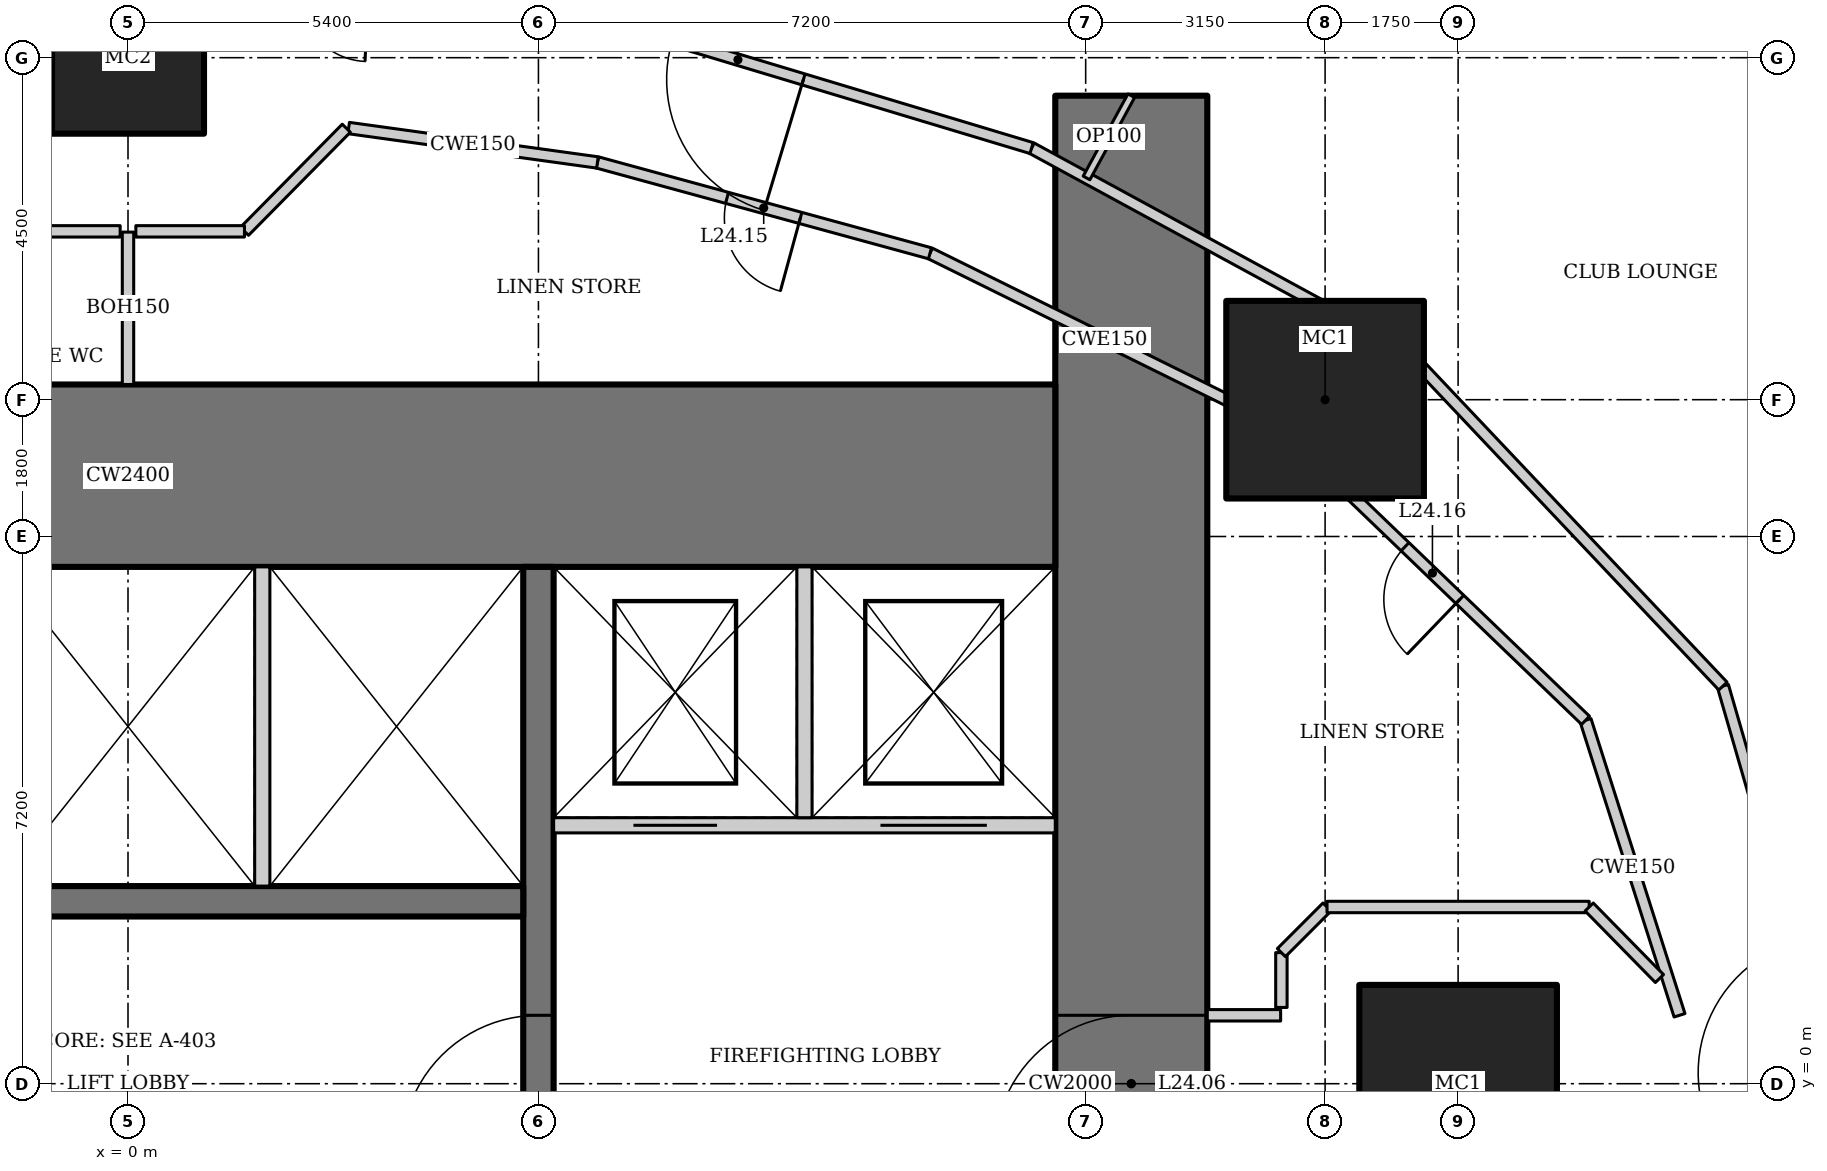
"""IFC4 building model, lengths in metres.
Left out: names, types, materials, properties, quantities, classifications, styles, units other than length and angle.
Written with IfcOpenShell. Run it as: python <this file> out.ifc"""

import sys

from ifc_helpers import new_model, si_unit, direction, frame, frame_2d, origin, origin_2d, place, context, subcontext, project, spatial, rectangle, hollow_rectangle, extrude, element, fill, save


model = new_model("IFC4")
c1 = context("Model", 3, precision=1e-05, world=origin(), true_north=direction((0.0, 1.0)))
c2 = subcontext(c1, "Body", "Model", "MODEL_VIEW")
j1 = project(units=[si_unit("LENGTHUNIT", "METRE"), si_unit("PLANEANGLEUNIT", "RADIAN")], contexts=[c1])
p1 = place(None, origin())
s1 = spatial("IfcSite", under=j1, at=p1, CompositionType="ELEMENT")
p2 = place(p1, origin())
s2 = spatial("IfcBuilding", under=s1, at=p2, CompositionType="ELEMENT")
p3 = place(p2, frame((0.0, 0.0, 101.8)))
s3 = spatial("IfcBuildingStorey", under=s2, at=p3, CompositionType="ELEMENT", Elevation=101.8)
for number, where, z_axis, x_axis in (
    (1, (17.5, 0.0, 0.0), (0.0, 0.0, 1.0), (1.0, 0.0, 0.0)),
    (2, (15.75, 9.0, 0.0), (0.0, 0.0, 1.0), (1.0, 0.0, 0.0)),
):
    element("IfcColumn", number, at=place(p3, frame(where, z_axis=z_axis, x_axis=x_axis)), inside=s3, PredefinedType="COLUMN", context=c2, shape_type="SweptSolid", body=[
        extrude(hollow_rectangle(XDim=2.6, YDim=2.6, WallThickness=0.13, at=origin_2d()), origin(), (0.0, 0.0, 1.0), 3.6),
    ])
p4 = place(p3, frame((0.0, 13.5, 0.0), z_axis=(0.0, 0.0, 1.0), x_axis=(1.0, 0.0, 0.0)))
e3 = element("IfcColumn", 3, at=p4, inside=s3, PredefinedType="COLUMN", context=c2, shape_type="SweptSolid", body=[
    extrude(hollow_rectangle(XDim=2.0, YDim=2.0, WallThickness=0.17, at=origin_2d()), origin(), (0.0, 0.0, 1.0), 3.6),
])
p5 = place(p3, frame((13.2, -13.0, 0.0), z_axis=(0.0, 0.0, 1.0), x_axis=(0.0, 1.0, 0.0)))
e4 = element("IfcWall", 4, at=p5, inside=s3, PredefinedType="SHEAR", context=c2, shape_type="SweptSolid", body=[
    extrude(rectangle(XDim=26.0, YDim=2.0, at=frame_2d((13.0, 0.0))), origin(), (0.0, 0.0, 1.0), 3.6),
])
p6 = place(p5, frame((12.1, 0.0, 0.0)))
e5 = element("IfcOpeningElement", 5, at=p6, cuts=e4, PredefinedType="OPENING", context=c2, shape_type="SweptSolid", body=[
    extrude(rectangle(XDim=1.8, YDim=2.1, at=frame_2d((0.9, 1.05))), frame((0.0, 1.01, 0.0), z_axis=(0.0, -1.0, 0.0), x_axis=(1.0, 0.0, 0.0)), (0.0, 0.0, 1.0), 2.02),
])
p7 = place(p3, frame((12.2, 8.0, 0.0), z_axis=(0.0, 0.0, 1.0), x_axis=(-1.0, 0.0, 0.0)))
e6 = element("IfcWall", 6, at=p7, inside=s3, PredefinedType="SHEAR", context=c2, shape_type="SweptSolid", body=[
    extrude(rectangle(XDim=24.4, YDim=2.4, at=frame_2d((12.2, 0.0))), origin(), (0.0, 0.0, 1.0), 3.6),
])
p8 = place(p3, frame((5.4, -6.8, 0.0), z_axis=(0.0, 0.0, 1.0), x_axis=(0.0, 1.0, 0.0)))
e7 = element("IfcWall", 7, at=p8, inside=s3, PredefinedType="SHEAR", context=c2, shape_type="SweptSolid", body=[
    extrude(rectangle(XDim=13.6, YDim=0.4, at=frame_2d((6.8, 0.0))), origin(), (0.0, 0.0, 1.0), 3.6),
])
p9 = place(p8, frame((5.9, 0.0, 0.0)))
e8 = element("IfcOpeningElement", 8, at=p9, cuts=e7, PredefinedType="OPENING", context=c2, shape_type="SweptSolid", body=[
    extrude(rectangle(XDim=1.8, YDim=2.1, at=frame_2d((0.9, 1.05))), frame((0.0, 0.21, 0.0), z_axis=(0.0, -1.0, 0.0), x_axis=(1.0, 0.0, 0.0)), (0.0, 0.0, 1.0), 0.42),
])
p10 = place(p3, frame((5.2, 2.4, 0.0), z_axis=(0.0, 0.0, 1.0), x_axis=(-1.0, 0.0, 0.0)))
e9 = element("IfcWall", 9, at=p10, inside=s3, PredefinedType="SHEAR", context=c2, shape_type="SweptSolid", body=[
    extrude(rectangle(XDim=10.4, YDim=0.4, at=frame_2d((5.2, 0.0))), origin(), (0.0, 0.0, 1.0), 3.6),
])
p11 = place(p3, frame((1.767, 2.6, 0.0), z_axis=(0.0, 0.0, 1.0), x_axis=(0.0, 1.0, 0.0)))
e10 = element("IfcWall", 10, at=p11, inside=s3, PredefinedType="SOLIDWALL", context=c2, shape_type="SweptSolid", body=[
    extrude(rectangle(XDim=4.2, YDim=0.2, at=frame_2d((2.1, 0.0))), origin(), (0.0, 0.0, 1.0), 3.6),
])
p12 = place(p3, frame((12.2, 3.4, 0.0), z_axis=(0.0, 0.0, 1.0), x_axis=(-1.0, 0.0, 0.0)))
e11 = element("IfcWall", 11, at=p12, inside=s3, PredefinedType="SOLIDWALL", context=c2, shape_type="SweptSolid", body=[
    extrude(rectangle(XDim=6.6, YDim=0.2, at=frame_2d((3.3, 0.0))), origin(), (0.0, 0.0, 1.0), 3.6),
])
p13 = place(p12, frame((4.45, 0.0, 0.0)))
e12 = element("IfcOpeningElement", 12, at=p13, cuts=e11, PredefinedType="OPENING", context=c2, shape_type="SweptSolid", body=[
    extrude(rectangle(XDim=1.1, YDim=2.2, at=frame_2d((0.55, 1.1))), frame((0.0, 0.11, 0.0), z_axis=(0.0, -1.0, 0.0), x_axis=(1.0, 0.0, 0.0)), (0.0, 0.0, 1.0), 0.22),
])
p14 = place(p12, frame((0.9, 0.0, 0.0)))
e13 = element("IfcOpeningElement", 13, at=p14, cuts=e11, PredefinedType="OPENING", context=c2, shape_type="SweptSolid", body=[
    extrude(rectangle(XDim=1.4, YDim=2.2, at=frame_2d((0.7, 1.1))), frame((0.0, 0.11, 0.0), z_axis=(0.0, -1.0, 0.0), x_axis=(1.0, 0.0, 0.0)), (0.0, 0.0, 1.0), 0.22),
])
p15 = place(p3, frame((8.9, 3.5, 0.0), z_axis=(0.0, 0.0, 1.0), x_axis=(0.0, 1.0, 0.0)))
e14 = element("IfcWall", 14, at=p15, inside=s3, PredefinedType="SOLIDWALL", context=c2, shape_type="SweptSolid", body=[
    extrude(rectangle(XDim=3.3, YDim=0.2, at=frame_2d((1.65, 0.0))), origin(), (0.0, 0.0, 1.0), 3.6),
])
p16 = place(p3, frame((22.5, 0.0, 0.0), z_axis=(0.0, 0.0, 1.0), x_axis=(-0.278247435376, 0.960509429785, 0.0)))
e15 = element("IfcWall", 15, at=p16, inside=s3, PredefinedType="PARTITIONING", context=c2, shape_type="SweptSolid", body=[
    extrude(rectangle(XDim=5.447, YDim=0.15, at=frame_2d((2.724, 0.0))), origin(), (0.0, 0.0, 1.0), 3.4),
])
p17 = place(p16, frame((0.15, 0.0, 0.0)))
e16 = element("IfcOpeningElement", 16, at=p17, cuts=e15, PredefinedType="OPENING", context=c2, shape_type="SweptSolid", body=[
    extrude(rectangle(XDim=1.8, YDim=2.1, at=frame_2d((0.9, 1.05))), frame((0.0, 0.085, 0.0), z_axis=(0.0, -1.0, 0.0), x_axis=(1.0, 0.0, 0.0)), (0.0, 0.0, 1.0), 0.17),
])
p18 = place(p3, frame((20.984, 5.232, 0.0), z_axis=(0.0, 0.0, 1.0), x_axis=(-0.687062608696, 0.726598218916, 0.0)))
e17 = element("IfcWall", 17, at=p18, inside=s3, PredefinedType="PARTITIONING", context=c2, shape_type="SweptSolid", body=[
    extrude(rectangle(XDim=6.039, YDim=0.15, at=frame_2d((3.02, 0.0))), origin(), (0.0, 0.0, 1.0), 3.4),
])
p19 = place(p3, frame((16.835, 9.62, 0.0), z_axis=(0.0, 0.0, 1.0), x_axis=(-0.878450059298, 0.477834169267, 0.0)))
e18 = element("IfcWall", 18, at=p19, inside=s3, PredefinedType="PARTITIONING", context=c2, shape_type="SweptSolid", body=[
    extrude(rectangle(XDim=5.631, YDim=0.15, at=frame_2d((2.815, 0.0))), origin(), (0.0, 0.0, 1.0), 3.4),
])
p20 = place(p3, frame((11.888, 12.311, 0.0), z_axis=(0.0, 0.0, 1.0), x_axis=(-0.957564241242, 0.288219922793, 0.0)))
e19 = element("IfcWall", 19, at=p20, inside=s3, PredefinedType="PARTITIONING", context=c2, shape_type="SweptSolid", body=[
    extrude(rectangle(XDim=5.085, YDim=0.15, at=frame_2d((2.542, 0.0))), origin(), (0.0, 0.0, 1.0), 3.4),
])
p21 = place(p20, frame((3.135, 0.0, 0.0)))
e20 = element("IfcOpeningElement", 20, at=p21, cuts=e19, PredefinedType="OPENING", context=c2, shape_type="SweptSolid", body=[
    extrude(rectangle(XDim=1.8, YDim=2.1, at=frame_2d((0.9, 1.05))), frame((0.0, 0.085, 0.0), z_axis=(0.0, -1.0, 0.0), x_axis=(1.0, 0.0, 0.0)), (0.0, 0.0, 1.0), 0.17),
])
p22 = place(p3, frame((20.984, -5.232, 0.0), z_axis=(0.0, 0.0, 1.0), x_axis=(0.278247435376, 0.960509429785, 0.0)))
e21 = element("IfcWall", 21, at=p22, inside=s3, PredefinedType="PARTITIONING", context=c2, shape_type="SweptSolid", body=[
    extrude(rectangle(XDim=5.447, YDim=0.15, at=frame_2d((2.724, 0.0))), origin(), (0.0, 0.0, 1.0), 3.4),
])
p23 = place(p22, frame((4.397, 0.0, 0.0)))
e22 = element("IfcOpeningElement", 22, at=p23, cuts=e21, PredefinedType="OPENING", context=c2, shape_type="SweptSolid", body=[
    extrude(rectangle(XDim=0.9, YDim=2.1, at=frame_2d((0.45, 1.05))), frame((0.0, 0.085, 0.0), z_axis=(0.0, -1.0, 0.0), x_axis=(1.0, 0.0, 0.0)), (0.0, 0.0, 1.0), 0.17),
])
p24 = place(p3, frame((20.413, 0.9, 0.0), z_axis=(0.0, 0.0, 1.0), x_axis=(-0.303505448228, 0.952829702988, 0.0)))
e23 = element("IfcWall", 23, at=p24, inside=s3, PredefinedType="PARTITIONING", context=c2, shape_type="SweptSolid", body=[
    extrude(rectangle(XDim=4.073, YDim=0.15, at=frame_2d((2.037, 0.0))), origin(), (0.0, 0.0, 1.0), 3.4),
])
p25 = place(p3, frame((19.177, 4.781, 0.0), z_axis=(0.0, 0.0, 1.0), x_axis=(-0.720837261072, 0.693104352209, 0.0)))
e24 = element("IfcWall", 24, at=p25, inside=s3, PredefinedType="PARTITIONING", context=c2, shape_type="SweptSolid", body=[
    extrude(rectangle(XDim=5.59, YDim=0.15, at=frame_2d((2.795, 0.0))), origin(), (0.0, 0.0, 1.0), 3.4),
])
p26 = place(p25, frame((2.295, 0.0, 0.0)))
e25 = element("IfcOpeningElement", 25, at=p26, cuts=e24, PredefinedType="OPENING", context=c2, shape_type="SweptSolid", body=[
    extrude(rectangle(XDim=1.0, YDim=2.1, at=frame_2d((0.5, 1.05))), frame((0.0, 0.085, 0.0), z_axis=(0.0, -1.0, 0.0), x_axis=(1.0, 0.0, 0.0)), (0.0, 0.0, 1.0), 0.17),
])
p27 = place(p3, frame((15.147, 8.656, 0.0), z_axis=(0.0, 0.0, 1.0), x_axis=(-0.89656943448, 0.442903205177, 0.0)))
e26 = element("IfcWall", 26, at=p27, inside=s3, PredefinedType="PARTITIONING", context=c2, shape_type="SweptSolid", body=[
    extrude(rectangle(XDim=5.126, YDim=0.15, at=frame_2d((2.563, 0.0))), origin(), (0.0, 0.0, 1.0), 3.4),
])
p28 = place(p3, frame((10.551, 10.926, 0.0), z_axis=(0.0, 0.0, 1.0), x_axis=(-0.964644466646, 0.263554648923, 0.0)))
e27 = element("IfcWall", 27, at=p28, inside=s3, PredefinedType="PARTITIONING", context=c2, shape_type="SweptSolid", body=[
    extrude(rectangle(XDim=4.535, YDim=0.15, at=frame_2d((2.268, 0.0))), origin(), (0.0, 0.0, 1.0), 3.4),
])
p29 = place(p28, frame((1.768, 0.0, 0.0)))
e28 = element("IfcOpeningElement", 28, at=p29, cuts=e27, PredefinedType="OPENING", context=c2, shape_type="SweptSolid", body=[
    extrude(rectangle(XDim=1.0, YDim=2.1, at=frame_2d((0.5, 1.05))), frame((0.0, 0.085, 0.0), z_axis=(0.0, -1.0, 0.0), x_axis=(1.0, 0.0, 0.0)), (0.0, 0.0, 1.0), 0.17),
])
p30 = place(p3, frame((6.176, 12.122, 0.0), z_axis=(0.0, 0.0, 1.0), x_axis=(-0.990563451353, 0.137054911782, 0.0)))
e29 = element("IfcWall", 29, at=p30, inside=s3, PredefinedType="PARTITIONING", context=c2, shape_type="SweptSolid", body=[
    extrude(rectangle(XDim=3.304, YDim=0.15, at=frame_2d((1.652, 0.0))), origin(), (0.0, 0.0, 1.0), 3.4),
])
p31 = place(p3, frame((13.2, 13.0, 0.0), z_axis=(0.0, 0.0, 1.0), x_axis=(-0.477852414256, -0.878440134665, 0.0)))
e30 = element("IfcWall", 30, at=p31, inside=s3, PredefinedType="PARTITIONING", context=c2, shape_type="SweptSolid", body=[
    extrude(rectangle(XDim=1.232, YDim=0.1, at=frame_2d((0.616, 0.0))), origin(), (0.0, 0.0, 1.0), 3.4),
])
p32 = place(p3, frame((0.0, 9.2, 0.0), z_axis=(0.0, 0.0, 1.0), x_axis=(0.0, 1.0, 0.0)))
e31 = element("IfcWall", 31, at=p32, inside=s3, PredefinedType="PARTITIONING", context=c2, shape_type="SweptSolid", body=[
    extrude(rectangle(XDim=2.005, YDim=0.15, at=frame_2d((1.002, 0.0))), origin(), (0.0, 0.0, 1.0), 2.2),
])
p33 = place(p3, frame((2.873, 12.572, 0.0), z_axis=(0.0, 0.0, 1.0), x_axis=(-0.702677261973, -0.711508724828, 0.0)))
e32 = element("IfcWall", 32, at=p33, inside=s3, PredefinedType="PARTITIONING", context=c2, shape_type="SweptSolid", body=[
    extrude(rectangle(XDim=1.907, YDim=0.15, at=frame_2d((0.954, 0.0))), origin(), (0.0, 0.0, 1.0), 3.4),
])
for number, where, z_axis, x_axis in (
    (33, (1.532, 11.215, 0.0), (0.0, 0.0, 1.0), (-1.0, 0.0, 0.0)),
    (34, (-0.103, 11.215, 0.0), (0.0, 0.0, 1.0), (-1.0, 0.0, 0.0)),
):
    element("IfcWall", number, at=place(p3, frame(where, z_axis=z_axis, x_axis=x_axis)), inside=s3, PredefinedType="PARTITIONING", context=c2, shape_type="SweptSolid", body=[
        extrude(rectangle(XDim=1.429, YDim=0.15, at=frame_2d((0.714, 0.0))), origin(), (0.0, 0.0, 1.0), 3.4),
    ])
p34 = place(p3, frame((14.2, 0.9, 0.0), z_axis=(0.0, 0.0, 1.0), x_axis=(1.0, 0.0, 0.0)))
e35 = element("IfcWall", 35, at=p34, inside=s3, PredefinedType="PARTITIONING", context=c2, shape_type="SweptSolid", body=[
    extrude(rectangle(XDim=0.965, YDim=0.15, at=frame_2d((0.482, 0.0))), origin(), (0.0, 0.0, 1.0), 3.4),
])
p35 = place(p3, frame((15.175, 1.003, 0.0), z_axis=(0.0, 0.0, 1.0), x_axis=(0.0, 1.0, 0.0)))
e36 = element("IfcWall", 36, at=p35, inside=s3, PredefinedType="PARTITIONING", context=c2, shape_type="SweptSolid", body=[
    extrude(rectangle(XDim=0.721, YDim=0.15, at=frame_2d((0.361, 0.0))), origin(), (0.0, 0.0, 1.0), 3.4),
])
p36 = place(p3, frame((15.175, 1.725, 0.0), z_axis=(0.0, 0.0, 1.0), x_axis=(0.707106781187, 0.707106781187, 0.0)))
e37 = element("IfcWall", 37, at=p36, inside=s3, PredefinedType="PARTITIONING", context=c2, shape_type="SweptSolid", body=[
    extrude(rectangle(XDim=0.849, YDim=0.15, at=frame_2d((0.425, 0.0))), origin(), (0.0, 0.0, 1.0), 3.4),
])
p37 = place(p3, frame((15.775, 2.325, 0.0), z_axis=(0.0, 0.0, 1.0), x_axis=(1.0, 0.0, 0.0)))
e38 = element("IfcWall", 38, at=p37, inside=s3, PredefinedType="PARTITIONING", context=c2, shape_type="SweptSolid", body=[
    extrude(rectangle(XDim=3.449, YDim=0.15, at=frame_2d((1.725, 0.0))), origin(), (0.0, 0.0, 1.0), 3.4),
])
p38 = place(p3, frame((19.225, 2.325, 0.0), z_axis=(0.0, 0.0, 1.0), x_axis=(0.700694560486, -0.713461374501, 0.0)))
e39 = element("IfcWall", 39, at=p38, inside=s3, PredefinedType="PARTITIONING", context=c2, shape_type="SweptSolid", body=[
    extrude(rectangle(XDim=1.32, YDim=0.15, at=frame_2d((0.66, 0.0))), origin(), (0.0, 0.0, 1.0), 3.4),
])
p39 = place(p9, origin())
e40 = element("IfcDoor", 40, at=p39, inside=s3, OperationType="DOUBLE_DOOR_DOUBLE_SWING", PredefinedType="DOOR", context=c2, shape_type="SweptSolid", body=[
    extrude(rectangle(XDim=1.8, YDim=2.1, at=frame_2d((0.9, 1.05))), frame((0.0, 0.025, 0.0), z_axis=(0.0, -1.0, 0.0), x_axis=(1.0, 0.0, 0.0)), (0.0, 0.0, 1.0), 0.05),
])
fill(e8, e40)
p40 = place(p6, origin())
e41 = element("IfcDoor", 41, at=p40, inside=s3, OperationType="DOUBLE_DOOR_DOUBLE_SWING", PredefinedType="DOOR", context=c2, shape_type="SweptSolid", body=[
    extrude(rectangle(XDim=1.8, YDim=2.1, at=frame_2d((0.9, 1.05))), frame((0.0, 0.025, 0.0), z_axis=(0.0, -1.0, 0.0), x_axis=(1.0, 0.0, 0.0)), (0.0, 0.0, 1.0), 0.05),
])
fill(e5, e41)
p41 = place(p13, origin())
e42 = element("IfcDoor", 42, at=p41, inside=s3, OperationType="DOUBLE_DOOR_SLIDING", PredefinedType="DOOR", context=c2, shape_type="SweptSolid", body=[
    extrude(rectangle(XDim=1.1, YDim=2.2, at=frame_2d((0.55, 1.1))), frame((0.0, 0.025, 0.0), z_axis=(0.0, -1.0, 0.0), x_axis=(1.0, 0.0, 0.0)), (0.0, 0.0, 1.0), 0.05),
])
fill(e12, e42)
p42 = place(p14, origin())
e43 = element("IfcDoor", 43, at=p42, inside=s3, OperationType="DOUBLE_DOOR_SLIDING", PredefinedType="DOOR", context=c2, shape_type="SweptSolid", body=[
    extrude(rectangle(XDim=1.4, YDim=2.2, at=frame_2d((0.7, 1.1))), frame((0.0, 0.025, 0.0), z_axis=(0.0, -1.0, 0.0), x_axis=(1.0, 0.0, 0.0)), (0.0, 0.0, 1.0), 0.05),
])
fill(e13, e43)
p43 = place(p29, origin())
e44 = element("IfcDoor", 44, at=p43, inside=s3, OperationType="SINGLE_SWING_LEFT", PredefinedType="DOOR", context=c2, shape_type="SweptSolid", body=[
    extrude(rectangle(XDim=1.0, YDim=2.1, at=frame_2d((0.5, 1.05))), frame((0.0, 0.025, 0.0), z_axis=(0.0, -1.0, 0.0), x_axis=(1.0, 0.0, 0.0)), (0.0, 0.0, 1.0), 0.05),
])
fill(e28, e44)
p44 = place(p26, origin())
e45 = element("IfcDoor", 45, at=p44, inside=s3, OperationType="SINGLE_SWING_LEFT", PredefinedType="DOOR", context=c2, shape_type="SweptSolid", body=[
    extrude(rectangle(XDim=1.0, YDim=2.1, at=frame_2d((0.5, 1.05))), frame((0.0, 0.025, 0.0), z_axis=(0.0, -1.0, 0.0), x_axis=(1.0, 0.0, 0.0)), (0.0, 0.0, 1.0), 0.05),
])
fill(e25, e45)
p45 = place(p21, origin())
e46 = element("IfcDoor", 46, at=p45, inside=s3, OperationType="DOUBLE_DOOR_DOUBLE_SWING", PredefinedType="DOOR", context=c2, shape_type="SweptSolid", body=[
    extrude(rectangle(XDim=1.8, YDim=2.1, at=frame_2d((0.9, 1.05))), frame((0.0, 0.025, 0.0), z_axis=(0.0, -1.0, 0.0), x_axis=(1.0, 0.0, 0.0)), (0.0, 0.0, 1.0), 0.05),
])
fill(e20, e46)
save(model, sys.argv[1])
